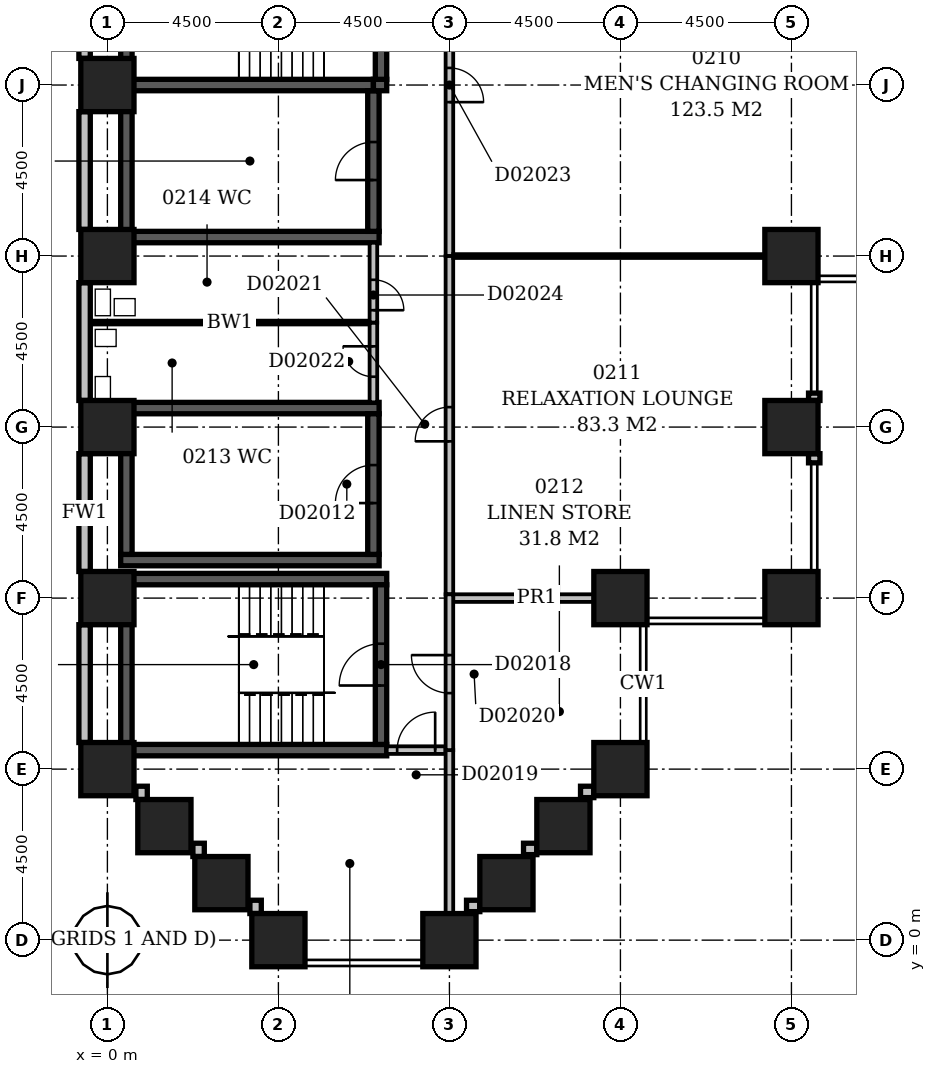
"""IFC4 building model, lengths in metres.
Left out: names, types, materials, properties, quantities, classifications, styles, units other than length and angle.
Written with IfcOpenShell. Run it as: python <this file> out.ifc"""

import sys

from ifc_helpers import new_model, si_unit, direction, frame, frame_2d, origin, origin_2d, place, context, subcontext, project, spatial, rectangle, extrude, element, fill, save


model = new_model("IFC4")
c1 = context("Model", 3, precision=1e-05, world=origin(), true_north=direction((0.0, 1.0)))
c2 = subcontext(c1, "Body", "Model", "MODEL_VIEW")
j1 = project(units=[si_unit("LENGTHUNIT", "METRE"), si_unit("PLANEANGLEUNIT", "RADIAN")], contexts=[c1])
p1 = place(None, origin())
s1 = spatial("IfcSite", under=j1, at=p1, CompositionType="ELEMENT")
p2 = place(p1, origin())
s2 = spatial("IfcBuilding", under=s1, at=p2, CompositionType="ELEMENT")
p3 = place(p2, frame((0.0, 0.0, 14.0)))
s3 = spatial("IfcBuildingStorey", under=s2, at=p3, CompositionType="ELEMENT", Elevation=14.0)
for number, where, z_axis, x_axis in (
    (1, (0.35, 5.0, -0.4), (0.0, 0.0, 1.0), (1.0, 0.0, 0.0)),
    (2, (0.35, 9.5, -0.4), (0.0, 0.0, 1.0), (1.0, 0.0, 0.0)),
):
    element("IfcWall", number, at=place(p3, frame(where, z_axis=z_axis, x_axis=x_axis)), inside=s3, PredefinedType="SHEAR", context=c2, shape_type="SweptSolid", body=[
        extrude(rectangle(XDim=7.0, YDim=0.3, at=frame_2d((3.5, 0.0))), origin(), (0.0, 0.0, 1.0), 5.0),
    ])
for number, where, z_axis, x_axis in (
    (3, (0.35, 10.0, -0.4), (0.0, 0.0, 1.0), (1.0, 0.0, 0.0)),
    (4, (0.35, 14.0, -0.4), (0.0, 0.0, 1.0), (1.0, 0.0, 0.0)),
    (5, (0.35, 18.5, -0.4), (0.0, 0.0, 1.0), (1.0, 0.0, 0.0)),
):
    element("IfcWall", number, at=place(p3, frame(where, z_axis=z_axis, x_axis=x_axis)), inside=s3, PredefinedType="SHEAR", context=c2, shape_type="SweptSolid", body=[
        extrude(rectangle(XDim=6.8, YDim=0.3, at=frame_2d((3.4, 0.0))), origin(), (0.0, 0.0, 1.0), 5.0),
    ])
p4 = place(p3, frame((0.35, 22.5, -0.4), z_axis=(0.0, 0.0, 1.0), x_axis=(1.0, 0.0, 0.0)))
e6 = element("IfcWall", 6, at=p4, inside=s3, PredefinedType="SHEAR", context=c2, shape_type="SweptSolid", body=[
    extrude(rectangle(XDim=6.65, YDim=0.3, at=frame_2d((3.325, 0.0))), origin(), (0.0, 0.0, 1.0), 5.0),
])
p5 = place(p3, frame((0.5, 5.15, -0.4), z_axis=(0.0, 0.0, 1.0), x_axis=(0.0, 1.0, 0.0)))
e7 = element("IfcWall", 7, at=p5, inside=s3, PredefinedType="SHEAR", context=c2, shape_type="SweptSolid", body=[
    extrude(rectangle(XDim=4.2, YDim=0.3, at=frame_2d((2.1, 0.0))), origin(), (0.0, 0.0, 1.0), 5.0),
])
for number, where, z_axis, x_axis in (
    (8, (0.5, 10.15, -0.4), (0.0, 0.0, 1.0), (0.0, 1.0, 0.0)),
    (9, (0.5, 18.65, -0.4), (0.0, 0.0, 1.0), (0.0, 1.0, 0.0)),
):
    element("IfcWall", number, at=place(p3, frame(where, z_axis=z_axis, x_axis=x_axis)), inside=s3, PredefinedType="SHEAR", context=c2, shape_type="SweptSolid", body=[
        extrude(rectangle(XDim=3.7, YDim=0.3, at=frame_2d((1.85, 0.0))), origin(), (0.0, 0.0, 1.0), 5.0),
    ])
p6 = place(p3, frame((0.5, 22.65, -0.4), z_axis=(0.0, 0.0, 1.0), x_axis=(0.0, 1.0, 0.0)))
e10 = element("IfcWall", 10, at=p6, inside=s3, PredefinedType="SHEAR", context=c2, shape_type="SweptSolid", body=[
    extrude(rectangle(XDim=4.2, YDim=0.3, at=frame_2d((2.1, 0.0))), origin(), (0.0, 0.0, 1.0), 5.0),
])
p7 = place(p3, frame((7.0, 10.15, -0.4), z_axis=(0.0, 0.0, 1.0), x_axis=(0.0, 1.0, 0.0)))
e11 = element("IfcWall", 11, at=p7, inside=s3, PredefinedType="SHEAR", context=c2, shape_type="SweptSolid", body=[
    extrude(rectangle(XDim=3.7, YDim=0.3, at=frame_2d((1.85, 0.0))), origin(), (0.0, 0.0, 1.0), 5.0),
])
p8 = place(p7, frame((1.35, 0.0, 0.4)))
e12 = element("IfcOpeningElement", 12, at=p8, cuts=e11, PredefinedType="OPENING", context=c2, shape_type="SweptSolid", body=[
    extrude(rectangle(XDim=1.0, YDim=2.1, at=frame_2d((0.5, 1.05))), frame((0.0, 0.162, 0.0), z_axis=(0.0, -1.0, 0.0), x_axis=(1.0, 0.0, 0.0)), (0.0, 0.0, 1.0), 0.324),
])
p9 = place(p3, frame((7.0, 18.65, -0.4), z_axis=(0.0, 0.0, 1.0), x_axis=(0.0, 1.0, 0.0)))
e13 = element("IfcWall", 13, at=p9, inside=s3, PredefinedType="SHEAR", context=c2, shape_type="SweptSolid", body=[
    extrude(rectangle(XDim=3.7, YDim=0.3, at=frame_2d((1.85, 0.0))), origin(), (0.0, 0.0, 1.0), 5.0),
])
p10 = place(p9, frame((1.35, 0.0, 0.4)))
e14 = element("IfcOpeningElement", 14, at=p10, cuts=e13, PredefinedType="OPENING", context=c2, shape_type="SweptSolid", body=[
    extrude(rectangle(XDim=1.0, YDim=2.1, at=frame_2d((0.5, 1.05))), frame((0.0, 0.162, 0.0), z_axis=(0.0, -1.0, 0.0), x_axis=(1.0, 0.0, 0.0)), (0.0, 0.0, 1.0), 0.324),
])
p11 = place(p3, frame((7.0, 22.5, -0.4), z_axis=(0.0, 0.0, 1.0), x_axis=(1.0, 0.0, 0.0)))
e15 = element("IfcWall", 15, at=p11, inside=s3, PredefinedType="SHEAR", context=c2, shape_type="SweptSolid", body=[
    extrude(rectangle(XDim=0.35, YDim=0.3, at=frame_2d((0.175, 0.0))), origin(), (0.0, 0.0, 1.0), 5.0),
])
p12 = place(p3, frame((7.2, 5.15, -0.4), z_axis=(0.0, 0.0, 1.0), x_axis=(0.0, 1.0, 0.0)))
e16 = element("IfcWall", 16, at=p12, inside=s3, PredefinedType="SHEAR", context=c2, shape_type="SweptSolid", body=[
    extrude(rectangle(XDim=4.2, YDim=0.3, at=frame_2d((2.1, 0.0))), origin(), (0.0, 0.0, 1.0), 5.0),
])
p13 = place(p12, frame((1.55, 0.0, 0.4)))
e17 = element("IfcOpeningElement", 17, at=p13, cuts=e16, PredefinedType="OPENING", context=c2, shape_type="SweptSolid", body=[
    extrude(rectangle(XDim=1.1, YDim=2.1, at=frame_2d((0.55, 1.05))), frame((0.0, 0.162, 0.0), z_axis=(0.0, -1.0, 0.0), x_axis=(1.0, 0.0, 0.0)), (0.0, 0.0, 1.0), 0.324),
])
p14 = place(p3, frame((7.2, 22.65, -0.4), z_axis=(0.0, 0.0, 1.0), x_axis=(0.0, 1.0, 0.0)))
e18 = element("IfcWall", 18, at=p14, inside=s3, PredefinedType="SHEAR", context=c2, shape_type="SweptSolid", body=[
    extrude(rectangle(XDim=4.2, YDim=0.3, at=frame_2d((2.1, 0.0))), origin(), (0.0, 0.0, 1.0), 5.0),
])
p15 = place(p14, frame((0.8, 0.0, 0.4)))
e19 = element("IfcOpeningElement", 19, at=p15, cuts=e18, PredefinedType="OPENING", context=c2, shape_type="SweptSolid", body=[
    extrude(rectangle(XDim=1.1, YDim=2.1, at=frame_2d((0.55, 1.05))), frame((0.0, 0.162, 0.0), z_axis=(0.0, -1.0, 0.0), x_axis=(1.0, 0.0, 0.0)), (0.0, 0.0, 1.0), 0.324),
])
for number, where, z_axis, x_axis in (
    (20, (4.5, 0.0, -0.4), (0.0, 0.0, 1.0), (1.0, 0.0, 0.0)),
    (21, (9.0, 0.0, -0.4), (0.0, 0.0, 1.0), (1.0, 0.0, 0.0)),
    (22, (3.0, 1.5, -0.4), (0.0, 0.0, 1.0), (1.0, 0.0, 0.0)),
    (23, (10.5, 1.5, -0.4), (0.0, 0.0, 1.0), (1.0, 0.0, 0.0)),
    (24, (1.5, 3.0, -0.4), (0.0, 0.0, 1.0), (1.0, 0.0, 0.0)),
    (25, (12.0, 3.0, -0.4), (0.0, 0.0, 1.0), (1.0, 0.0, 0.0)),
    (26, (0.0, 4.5, -0.4), (0.0, 0.0, 1.0), (1.0, 0.0, 0.0)),
    (27, (13.5, 4.5, -0.4), (0.0, 0.0, 1.0), (1.0, 0.0, 0.0)),
    (28, (0.0, 9.0, -0.4), (0.0, 0.0, 1.0), (1.0, 0.0, 0.0)),
    (29, (13.5, 9.0, -0.4), (0.0, 0.0, 1.0), (1.0, 0.0, 0.0)),
    (30, (18.0, 9.0, -0.4), (0.0, 0.0, 1.0), (1.0, 0.0, 0.0)),
    (31, (0.0, 13.5, -0.4), (0.0, 0.0, 1.0), (1.0, 0.0, 0.0)),
    (32, (18.0, 13.5, -0.4), (0.0, 0.0, 1.0), (1.0, 0.0, 0.0)),
    (33, (0.0, 18.0, -0.4), (0.0, 0.0, 1.0), (1.0, 0.0, 0.0)),
    (34, (18.0, 18.0, -0.4), (0.0, 0.0, 1.0), (1.0, 0.0, 0.0)),
    (35, (0.0, 22.5, -0.4), (0.0, 0.0, 1.0), (1.0, 0.0, 0.0)),
):
    element("IfcColumn", number, at=place(p3, frame(where, z_axis=z_axis, x_axis=x_axis)), inside=s3, PredefinedType="COLUMN", context=c2, shape_type="SweptSolid", body=[
        extrude(rectangle(XDim=1.4, YDim=1.4, at=origin_2d()), origin(), (0.0, 0.0, 1.0), 5.0),
    ])
for number, where, z_axis, x_axis in (
    (36, (9.45, 0.9, 0.0), (0.0, 0.0, 1.0), (1.0, 0.0, 0.0)),
    (37, (10.95, 2.4, 0.0), (0.0, 0.0, 1.0), (1.0, 0.0, 0.0)),
    (38, (12.45, 3.9, 0.0), (0.0, 0.0, 1.0), (1.0, 0.0, 0.0)),
):
    element("IfcWall", number, at=place(p3, frame(where, z_axis=z_axis, x_axis=x_axis)), inside=s3, PredefinedType="STANDARD", context=c2, shape_type="SweptSolid", body=[
        extrude(rectangle(XDim=0.35, YDim=0.3, at=frame_2d((0.175, 0.0))), origin(), (0.0, 0.0, 1.0), 3.9),
    ])
p16 = place(p3, frame((18.6, 12.559, 0.0), z_axis=(0.0, 0.0, 1.0), x_axis=(0.0, 1.0, 0.0)))
e39 = element("IfcWall", 39, at=p16, inside=s3, PredefinedType="STANDARD", context=c2, shape_type="SweptSolid", body=[
    extrude(rectangle(XDim=0.241, YDim=0.3, at=frame_2d((0.121, 0.0))), origin(), (0.0, 0.0, 1.0), 3.9),
])
p17 = place(p3, frame((18.6, 14.2, 0.0), z_axis=(0.0, 0.0, 1.0), x_axis=(0.0, 1.0, 0.0)))
e40 = element("IfcWall", 40, at=p17, inside=s3, PredefinedType="STANDARD", context=c2, shape_type="SweptSolid", body=[
    extrude(rectangle(XDim=0.194, YDim=0.3, at=frame_2d((0.097, 0.0))), origin(), (0.0, 0.0, 1.0), 3.9),
])
for number, where, z_axis, x_axis in (
    (41, (-0.6, 26.3, 0.0), (0.0, 0.0, 1.0), (0.0, -1.0, 0.0)),
    (42, (-0.6, 21.8, 0.0), (0.0, 0.0, 1.0), (0.0, -1.0, 0.0)),
    (43, (-0.6, 17.3, 0.0), (0.0, 0.0, 1.0), (0.0, -1.0, 0.0)),
    (44, (-0.6, 12.8, 0.0), (0.0, 0.0, 1.0), (0.0, -1.0, 0.0)),
    (45, (-0.6, 8.3, 0.0), (0.0, 0.0, 1.0), (0.0, -1.0, 0.0)),
):
    element("IfcWall", number, at=place(p3, frame(where, z_axis=z_axis, x_axis=x_axis)), inside=s3, PredefinedType="STANDARD", context=c2, shape_type="SweptSolid", body=[
        extrude(rectangle(XDim=3.1, YDim=0.3, at=frame_2d((1.55, 0.0))), origin(), (0.0, 0.0, 1.0), 3.9),
    ])
for number, where, z_axis, x_axis in (
    (46, (0.9, 4.05, 0.0), (0.0, 0.0, 1.0), (0.0, -1.0, 0.0)),
    (47, (2.4, 2.55, 0.0), (0.0, 0.0, 1.0), (0.0, -1.0, 0.0)),
    (48, (3.9, 1.05, 0.0), (0.0, 0.0, 1.0), (0.0, -1.0, 0.0)),
):
    element("IfcWall", number, at=place(p3, frame(where, z_axis=z_axis, x_axis=x_axis)), inside=s3, PredefinedType="STANDARD", context=c2, shape_type="SweptSolid", body=[
        extrude(rectangle(XDim=0.35, YDim=0.3, at=frame_2d((0.175, 0.0))), origin(), (0.0, 0.0, 1.0), 3.9),
    ])
p18 = place(p3, frame((9.0, 0.0, 0.0), z_axis=(0.0, 0.0, 1.0), x_axis=(0.0, 1.0, 0.0)))
e49 = element("IfcWall", 49, at=p18, inside=s3, PredefinedType="PARTITIONING", context=c2, shape_type="SweptSolid", body=[
    extrude(rectangle(XDim=5.0, YDim=0.2, at=frame_2d((2.5, 0.0))), origin(), (0.0, 0.0, 1.0), 4.6),
])
p19 = place(p3, frame((7.35, 5.0, 0.0), z_axis=(0.0, 0.0, 1.0), x_axis=(1.0, 0.0, 0.0)))
e50 = element("IfcWall", 50, at=p19, inside=s3, PredefinedType="PARTITIONING", context=c2, shape_type="SweptSolid", body=[
    extrude(rectangle(XDim=1.55, YDim=0.2, at=frame_2d((0.775, 0.0))), origin(), (0.0, 0.0, 1.0), 4.6),
])
p20 = place(p19, frame((0.275, 0.0, 0.0)))
e51 = element("IfcOpeningElement", 51, at=p20, cuts=e50, PredefinedType="OPENING", context=c2, shape_type="SweptSolid", body=[
    extrude(rectangle(XDim=1.0, YDim=2.1, at=frame_2d((0.5, 1.05))), frame((0.0, 0.112, 0.0), z_axis=(0.0, -1.0, 0.0), x_axis=(1.0, 0.0, 0.0)), (0.0, 0.0, 1.0), 0.224),
])
p21 = place(p3, frame((9.0, 5.0, 0.0), z_axis=(0.0, 0.0, 1.0), x_axis=(0.0, 1.0, 0.0)))
e52 = element("IfcWall", 52, at=p21, inside=s3, PredefinedType="PARTITIONING", context=c2, shape_type="SweptSolid", body=[
    extrude(rectangle(XDim=4.1, YDim=0.2, at=frame_2d((2.05, 0.0))), origin(), (0.0, 0.0, 1.0), 4.6),
])
p22 = place(p21, frame((1.5, 0.0, 0.0)))
e53 = element("IfcOpeningElement", 53, at=p22, cuts=e52, PredefinedType="OPENING", context=c2, shape_type="SweptSolid", body=[
    extrude(rectangle(XDim=1.0, YDim=2.1, at=frame_2d((0.5, 1.05))), frame((0.0, 0.112, 0.0), z_axis=(0.0, -1.0, 0.0), x_axis=(1.0, 0.0, 0.0)), (0.0, 0.0, 1.0), 0.224),
])
p23 = place(p3, frame((9.0, 9.1, 0.0), z_axis=(0.0, 0.0, 1.0), x_axis=(0.0, 1.0, 0.0)))
e54 = element("IfcWall", 54, at=p23, inside=s3, PredefinedType="PARTITIONING", context=c2, shape_type="SweptSolid", body=[
    extrude(rectangle(XDim=8.9, YDim=0.2, at=frame_2d((4.45, 0.0))), origin(), (0.0, 0.0, 1.0), 4.6),
])
p24 = place(p23, frame((4.025, 0.0, 0.0)))
e55 = element("IfcOpeningElement", 55, at=p24, cuts=e54, PredefinedType="OPENING", context=c2, shape_type="SweptSolid", body=[
    extrude(rectangle(XDim=0.9, YDim=2.1, at=frame_2d((0.45, 1.05))), frame((0.0, 0.112, 0.0), z_axis=(0.0, -1.0, 0.0), x_axis=(1.0, 0.0, 0.0)), (0.0, 0.0, 1.0), 0.224),
])
p25 = place(p3, frame((13.5, 9.0, 0.0), z_axis=(0.0, 0.0, 1.0), x_axis=(-1.0, 0.0, 0.0)))
e56 = element("IfcWall", 56, at=p25, inside=s3, PredefinedType="PARTITIONING", context=c2, shape_type="SweptSolid", body=[
    extrude(rectangle(XDim=4.4, YDim=0.2, at=frame_2d((2.2, 0.0))), origin(), (0.0, 0.0, 1.0), 4.6),
])
p26 = place(p3, frame((14.2, 9.0, 0.0), z_axis=(0.0, 0.0, 1.0), x_axis=(-1.0, 0.0, 0.0)))
e57 = element("IfcWall", 57, at=p26, inside=s3, PredefinedType="PARTITIONING", context=c2, shape_type="SweptSolid", body=[
    extrude(rectangle(XDim=0.7, YDim=0.2, at=frame_2d((0.35, 0.0))), origin(), (0.0, 0.0, 1.0), 3.9),
])
p27 = place(p3, frame((-0.45, 16.25, 0.0), z_axis=(0.0, 0.0, 1.0), x_axis=(1.0, 0.0, 0.0)))
e58 = element("IfcWall", 58, at=p27, inside=s3, PredefinedType="PLUMBINGWALL", context=c2, shape_type="SweptSolid", body=[
    extrude(rectangle(XDim=7.35, YDim=0.1, at=frame_2d((3.675, 0.0))), origin(), (0.0, 0.0, 1.0), 4.6),
])
p28 = place(p3, frame((7.0, 16.25, 0.0), z_axis=(0.0, 0.0, 1.0), x_axis=(0.0, -1.0, 0.0)))
e59 = element("IfcWall", 59, at=p28, inside=s3, PredefinedType="PARTITIONING", context=c2, shape_type="SweptSolid", body=[
    extrude(rectangle(XDim=2.1, YDim=0.2, at=frame_2d((1.05, 0.0))), origin(), (0.0, 0.0, 1.0), 4.6),
])
p29 = place(p28, frame((0.625, 0.0, 0.0)))
e60 = element("IfcOpeningElement", 60, at=p29, cuts=e59, PredefinedType="OPENING", context=c2, shape_type="SweptSolid", body=[
    extrude(rectangle(XDim=0.8, YDim=2.1, at=frame_2d((0.4, 1.05))), frame((0.0, 0.112, 0.0), z_axis=(0.0, -1.0, 0.0), x_axis=(1.0, 0.0, 0.0)), (0.0, 0.0, 1.0), 0.224),
])
p30 = place(p3, frame((9.0, 18.0, 0.0), z_axis=(0.0, 0.0, 1.0), x_axis=(0.0, 1.0, 0.0)))
e61 = element("IfcWall", 61, at=p30, inside=s3, PredefinedType="PARTITIONING", context=c2, shape_type="SweptSolid", body=[
    extrude(rectangle(XDim=9.0, YDim=0.2, at=frame_2d((4.5, 0.0))), origin(), (0.0, 0.0, 1.0), 4.6),
])
p31 = place(p30, frame((4.05, 0.0, 0.0)))
e62 = element("IfcOpeningElement", 62, at=p31, cuts=e61, PredefinedType="OPENING", context=c2, shape_type="SweptSolid", body=[
    extrude(rectangle(XDim=0.9, YDim=2.1, at=frame_2d((0.45, 1.05))), frame((0.0, 0.112, 0.0), z_axis=(0.0, -1.0, 0.0), x_axis=(1.0, 0.0, 0.0)), (0.0, 0.0, 1.0), 0.224),
])
p32 = place(p3, frame((18.0, 18.0, 0.0), z_axis=(0.0, 0.0, 1.0), x_axis=(-1.0, 0.0, 0.0)))
e63 = element("IfcWall", 63, at=p32, inside=s3, PredefinedType="PARTITIONING", context=c2, shape_type="SweptSolid", body=[
    extrude(rectangle(XDim=8.9, YDim=0.1, at=frame_2d((4.45, 0.0))), origin(), (0.0, 0.0, 1.0), 3.9),
])
p33 = place(p3, frame((18.7, 18.0, 0.0), z_axis=(0.0, 0.0, 1.0), x_axis=(-1.0, 0.0, 0.0)))
e64 = element("IfcWall", 64, at=p33, inside=s3, PredefinedType="PARTITIONING", context=c2, shape_type="SweptSolid", body=[
    extrude(rectangle(XDim=0.7, YDim=0.1, at=frame_2d((0.35, 0.0))), origin(), (0.0, 0.0, 1.0), 3.9),
])
p34 = place(p3, frame((7.0, 18.35, 0.0), z_axis=(0.0, 0.0, 1.0), x_axis=(0.0, -1.0, 0.0)))
e65 = element("IfcWall", 65, at=p34, inside=s3, PredefinedType="PARTITIONING", context=c2, shape_type="SweptSolid", body=[
    extrude(rectangle(XDim=2.1, YDim=0.2, at=frame_2d((1.05, 0.0))), origin(), (0.0, 0.0, 1.0), 4.6),
])
p35 = place(p34, frame((0.975, 0.0, 0.0)))
e66 = element("IfcOpeningElement", 66, at=p35, cuts=e65, PredefinedType="OPENING", context=c2, shape_type="SweptSolid", body=[
    extrude(rectangle(XDim=0.8, YDim=2.1, at=frame_2d((0.4, 1.05))), frame((0.0, 0.112, 0.0), z_axis=(0.0, -1.0, 0.0), x_axis=(1.0, 0.0, 0.0)), (0.0, 0.0, 1.0), 0.224),
])
p36 = place(p10, origin())
e67 = element("IfcDoor", 67, at=p36, inside=s3, OperationType="SINGLE_SWING_LEFT", PredefinedType="DOOR", context=c2, shape_type="SweptSolid", body=[
    extrude(rectangle(XDim=1.0, YDim=2.1, at=frame_2d((0.5, 1.05))), frame((0.0, 0.025, 0.0), z_axis=(0.0, -1.0, 0.0), x_axis=(1.0, 0.0, 0.0)), (0.0, 0.0, 1.0), 0.05),
])
fill(e14, e67)
p37 = place(p8, origin())
e68 = element("IfcDoor", 68, at=p37, inside=s3, OperationType="SINGLE_SWING_LEFT", PredefinedType="DOOR", context=c2, shape_type="SweptSolid", body=[
    extrude(rectangle(XDim=1.0, YDim=2.1, at=frame_2d((0.5, 1.05))), frame((0.0, 0.025, 0.0), z_axis=(0.0, -1.0, 0.0), x_axis=(1.0, 0.0, 0.0)), (0.0, 0.0, 1.0), 0.05),
])
fill(e12, e68)
p38 = place(p13, origin())
e69 = element("IfcDoor", 69, at=p38, inside=s3, OperationType="SINGLE_SWING_LEFT", PredefinedType="DOOR", context=c2, shape_type="SweptSolid", body=[
    extrude(rectangle(XDim=1.1, YDim=2.1, at=frame_2d((0.55, 1.05))), frame((0.0, 0.025, 0.0), z_axis=(0.0, -1.0, 0.0), x_axis=(1.0, 0.0, 0.0)), (0.0, 0.0, 1.0), 0.05),
])
fill(e17, e69)
p39 = place(p20, frame((1.0, 0.0, 0.0), z_axis=(0.0, 0.0, 1.0), x_axis=(-1.0, 0.0, 0.0)))
e70 = element("IfcDoor", 70, at=p39, inside=s3, OperationType="SINGLE_SWING_LEFT", PredefinedType="DOOR", context=c2, shape_type="SweptSolid", body=[
    extrude(rectangle(XDim=1.0, YDim=2.1, at=frame_2d((0.5, 1.05))), frame((0.0, 0.025, 0.0), z_axis=(0.0, -1.0, 0.0), x_axis=(1.0, 0.0, 0.0)), (0.0, 0.0, 1.0), 0.05),
])
fill(e51, e70)
p40 = place(p22, frame((1.0, 0.0, 0.0), z_axis=(0.0, 0.0, 1.0), x_axis=(-1.0, 0.0, 0.0)))
e71 = element("IfcDoor", 71, at=p40, inside=s3, OperationType="SINGLE_SWING_LEFT", PredefinedType="DOOR", context=c2, shape_type="SweptSolid", body=[
    extrude(rectangle(XDim=1.0, YDim=2.1, at=frame_2d((0.5, 1.05))), frame((0.0, 0.025, 0.0), z_axis=(0.0, -1.0, 0.0), x_axis=(1.0, 0.0, 0.0)), (0.0, 0.0, 1.0), 0.05),
])
fill(e53, e71)
p41 = place(p24, origin())
e72 = element("IfcDoor", 72, at=p41, inside=s3, OperationType="SINGLE_SWING_LEFT", PredefinedType="DOOR", context=c2, shape_type="SweptSolid", body=[
    extrude(rectangle(XDim=0.9, YDim=2.1, at=frame_2d((0.45, 1.05))), frame((0.0, 0.025, 0.0), z_axis=(0.0, -1.0, 0.0), x_axis=(1.0, 0.0, 0.0)), (0.0, 0.0, 1.0), 0.05),
])
fill(e55, e72)
p42 = place(p29, frame((0.8, 0.0, 0.0), z_axis=(0.0, 0.0, 1.0), x_axis=(-1.0, 0.0, 0.0)))
e73 = element("IfcDoor", 73, at=p42, inside=s3, OperationType="SINGLE_SWING_RIGHT", PredefinedType="DOOR", context=c2, shape_type="SweptSolid", body=[
    extrude(rectangle(XDim=0.8, YDim=2.1, at=frame_2d((0.4, 1.05))), frame((0.0, 0.025, 0.0), z_axis=(0.0, -1.0, 0.0), x_axis=(1.0, 0.0, 0.0)), (0.0, 0.0, 1.0), 0.05),
])
fill(e60, e73)
p43 = place(p31, frame((0.9, 0.0, 0.0), z_axis=(0.0, 0.0, 1.0), x_axis=(-1.0, 0.0, 0.0)))
e74 = element("IfcDoor", 74, at=p43, inside=s3, OperationType="SINGLE_SWING_RIGHT", PredefinedType="DOOR", context=c2, shape_type="SweptSolid", body=[
    extrude(rectangle(XDim=0.9, YDim=2.1, at=frame_2d((0.45, 1.05))), frame((0.0, 0.025, 0.0), z_axis=(0.0, -1.0, 0.0), x_axis=(1.0, 0.0, 0.0)), (0.0, 0.0, 1.0), 0.05),
])
fill(e62, e74)
p44 = place(p35, frame((0.8, 0.0, 0.0), z_axis=(0.0, 0.0, 1.0), x_axis=(-1.0, 0.0, 0.0)))
e75 = element("IfcDoor", 75, at=p44, inside=s3, OperationType="SINGLE_SWING_LEFT", PredefinedType="DOOR", context=c2, shape_type="SweptSolid", body=[
    extrude(rectangle(XDim=0.8, YDim=2.1, at=frame_2d((0.4, 1.05))), frame((0.0, 0.025, 0.0), z_axis=(0.0, -1.0, 0.0), x_axis=(1.0, 0.0, 0.0)), (0.0, 0.0, 1.0), 0.05),
])
fill(e66, e75)
save(model, sys.argv[1])
